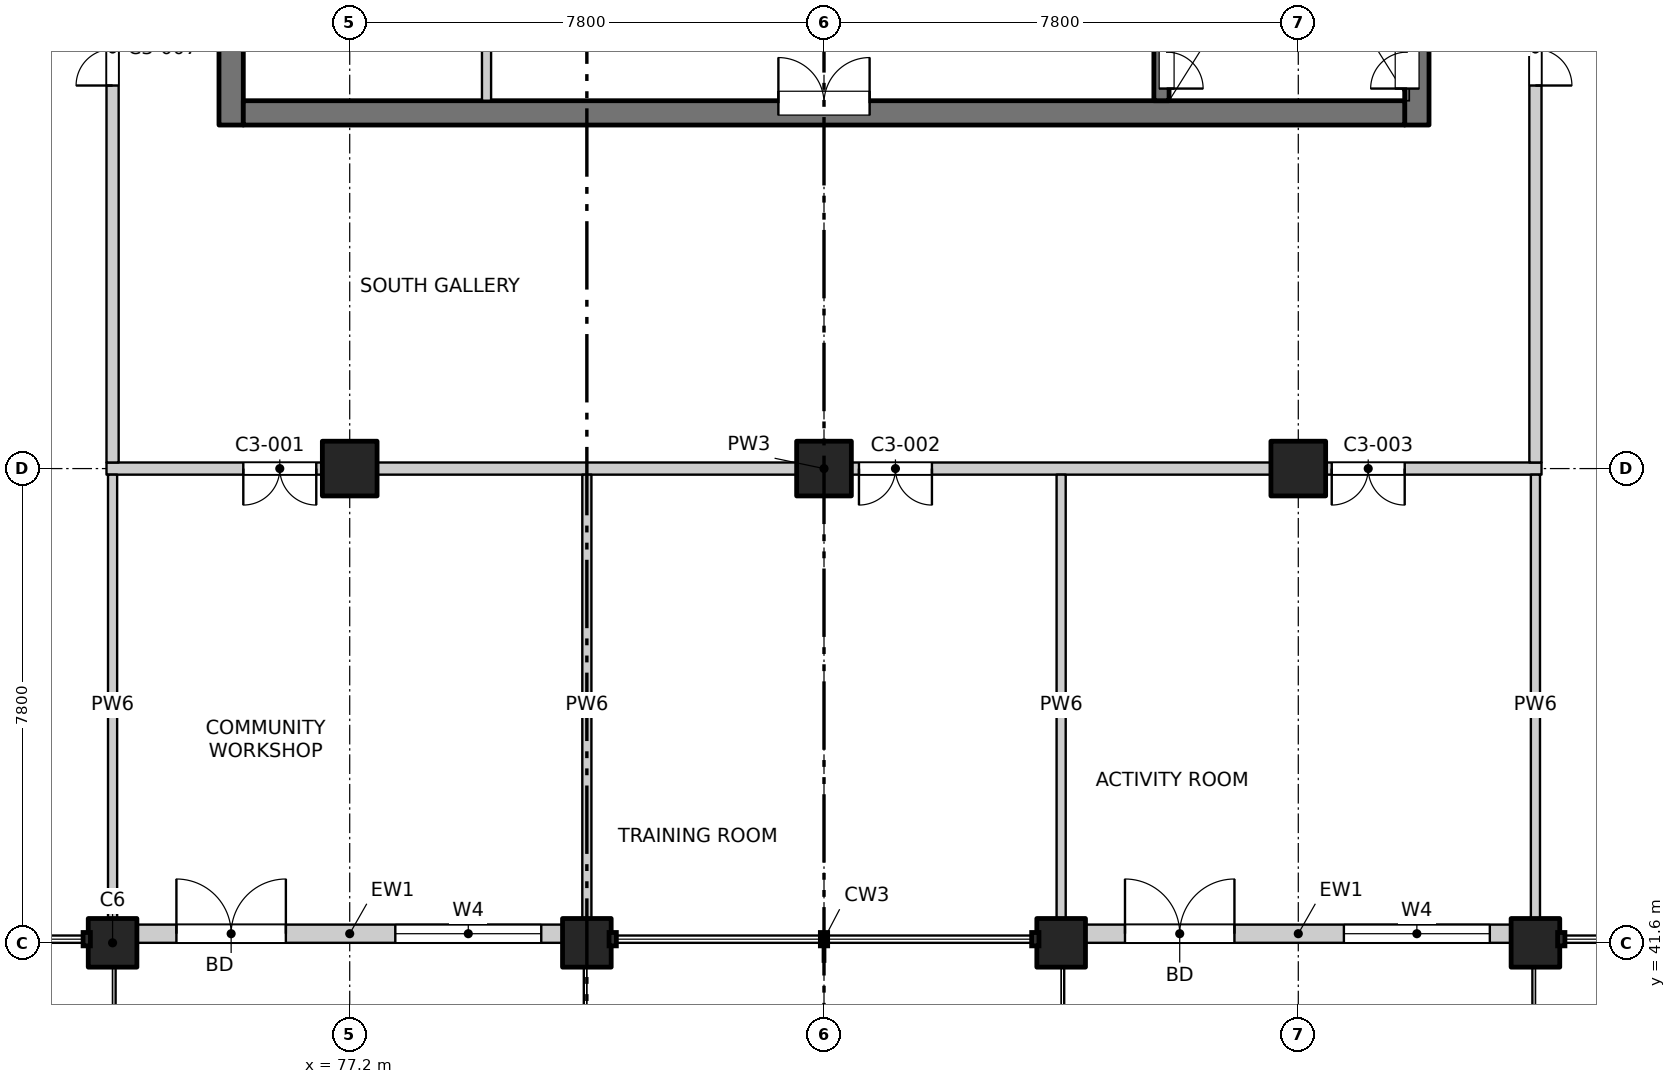
"""IFC4 building model, lengths in metres.
Left out: names, types, materials, properties, quantities, classifications, styles, units other than length and angle.
Written with IfcOpenShell. Run it as: python <this file> out.ifc"""

import sys

from ifc_helpers import new_model, si_unit, direction, frame, frame_2d, origin, origin_2d, place, context, subcontext, project, spatial, rectangle, extrude, element, fill, save


model = new_model("IFC4")
c1 = context("Model", 3, precision=1e-05, world=origin(), true_north=direction((0.0, 1.0)))
c2 = subcontext(c1, "Body", "Model", "MODEL_VIEW")
j1 = project(units=[si_unit("LENGTHUNIT", "METRE"), si_unit("PLANEANGLEUNIT", "RADIAN")], contexts=[c1])
p1 = place(None, origin())
s1 = spatial("IfcSite", under=j1, at=p1, CompositionType="ELEMENT")
p2 = place(p1, origin())
s2 = spatial("IfcBuilding", under=s1, at=p2, CompositionType="ELEMENT")
p3 = place(p2, frame((0.0, 0.0, 200.7)))
s3 = spatial("IfcBuildingStorey", under=s2, at=p3, CompositionType="ELEMENT", Elevation=200.7)
for number, where, z_axis, x_axis in (
    (1, (73.3, 41.6, -0.25), (0.0, 0.0, 1.0), (1.0, 0.0, 0.0)),
    (2, (81.1, 41.6, -0.25), (0.0, 0.0, 1.0), (1.0, 0.0, 0.0)),
    (3, (88.9, 41.6, -0.25), (0.0, 0.0, 1.0), (1.0, 0.0, 0.0)),
    (4, (96.7, 41.6, -0.25), (0.0, 0.0, 1.0), (1.0, 0.0, 0.0)),
):
    element("IfcColumn", number, at=place(p3, frame(where, z_axis=z_axis, x_axis=x_axis)), inside=s3, PredefinedType="COLUMN", context=c2, shape_type="SweptSolid", body=[
        extrude(rectangle(XDim=0.8, YDim=0.8, at=origin_2d()), origin(), (0.0, 0.0, 1.0), 3.4),
    ])
for number, where, z_axis, x_axis in (
    (5, (77.2, 49.4, -0.25), (0.0, 0.0, 1.0), (1.0, 0.0, 0.0)),
    (6, (85.0, 49.4, -0.25), (0.0, 0.0, 1.0), (1.0, 0.0, 0.0)),
    (7, (92.8, 49.4, -0.25), (0.0, 0.0, 1.0), (1.0, 0.0, 0.0)),
):
    element("IfcColumn", number, at=place(p3, frame(where, z_axis=z_axis, x_axis=x_axis)), inside=s3, PredefinedType="COLUMN", context=c2, shape_type="SweptSolid", body=[
        extrude(rectangle(XDim=0.9, YDim=0.9, at=origin_2d()), origin(), (0.0, 0.0, 1.0), 3.4),
    ])
p4 = place(p3, frame((75.25, 55.05, -0.25), z_axis=(0.0, 0.0, 1.0), x_axis=(0.0, 1.0, 0.0)))
e8 = element("IfcWall", 8, at=p4, inside=s3, PredefinedType="SOLIDWALL", context=c2, shape_type="SweptSolid", body=[
    extrude(rectangle(XDim=22.25, YDim=0.4, at=frame_2d((11.125, 0.0))), origin(), (0.0, 0.0, 1.0), 3.4),
])
p5 = place(p4, frame((7.4, 0.0, 0.25)))
e9 = element("IfcOpeningElement", 9, at=p5, cuts=e8, PredefinedType="OPENING", context=c2, shape_type="SweptSolid", body=[
    extrude(rectangle(XDim=0.9, YDim=2.1, at=frame_2d((0.45, 1.05))), frame((0.0, 0.21, 0.0), z_axis=(0.0, -1.0, 0.0), x_axis=(1.0, 0.0, 0.0)), (0.0, 0.0, 1.0), 0.42),
])
p6 = place(p4, frame((10.7, 0.0, 0.25)))
e10 = element("IfcOpeningElement", 10, at=p6, cuts=e8, PredefinedType="OPENING", context=c2, shape_type="SweptSolid", body=[
    extrude(rectangle(XDim=0.9, YDim=2.1, at=frame_2d((0.45, 1.05))), frame((0.0, 0.21, 0.0), z_axis=(0.0, -1.0, 0.0), x_axis=(1.0, 0.0, 0.0)), (0.0, 0.0, 1.0), 0.42),
])
p7 = place(p4, frame((13.7, 0.0, 0.25)))
e11 = element("IfcOpeningElement", 11, at=p7, cuts=e8, PredefinedType="OPENING", context=c2, shape_type="SweptSolid", body=[
    extrude(rectangle(XDim=0.9, YDim=2.1, at=frame_2d((0.45, 1.05))), frame((0.0, 0.21, 0.0), z_axis=(0.0, -1.0, 0.0), x_axis=(1.0, 0.0, 0.0)), (0.0, 0.0, 1.0), 0.42),
])
p8 = place(p4, frame((16.7, 0.0, 0.25)))
e12 = element("IfcOpeningElement", 12, at=p8, cuts=e8, PredefinedType="OPENING", context=c2, shape_type="SweptSolid", body=[
    extrude(rectangle(XDim=0.9, YDim=2.1, at=frame_2d((0.45, 1.05))), frame((0.0, 0.21, 0.0), z_axis=(0.0, -1.0, 0.0), x_axis=(1.0, 0.0, 0.0)), (0.0, 0.0, 1.0), 0.42),
])
p9 = place(p4, frame((20.0, 0.0, 0.25)))
e13 = element("IfcOpeningElement", 13, at=p9, cuts=e8, PredefinedType="OPENING", context=c2, shape_type="SweptSolid", body=[
    extrude(rectangle(XDim=0.9, YDim=2.1, at=frame_2d((0.45, 1.05))), frame((0.0, 0.21, 0.0), z_axis=(0.0, -1.0, 0.0), x_axis=(1.0, 0.0, 0.0)), (0.0, 0.0, 1.0), 0.42),
])
p10 = place(p3, frame((94.75, 55.05, -0.25), z_axis=(0.0, 0.0, 1.0), x_axis=(0.0, 1.0, 0.0)))
e14 = element("IfcWall", 14, at=p10, inside=s3, PredefinedType="SOLIDWALL", context=c2, shape_type="SweptSolid", body=[
    extrude(rectangle(XDim=6.9, YDim=0.4, at=frame_2d((3.45, 0.0))), origin(), (0.0, 0.0, 1.0), 3.4),
])
p11 = place(p10, frame((0.6, 0.0, 0.25)))
e15 = element("IfcOpeningElement", 15, at=p11, cuts=e14, PredefinedType="OPENING", context=c2, shape_type="SweptSolid", body=[
    extrude(rectangle(XDim=1.2, YDim=2.1, at=frame_2d((0.6, 1.05))), frame((0.0, 0.21, 0.0), z_axis=(0.0, -1.0, 0.0), x_axis=(1.0, 0.0, 0.0)), (0.0, 0.0, 1.0), 0.42),
])
p12 = place(p3, frame((75.45, 55.25, -0.25), z_axis=(0.0, 0.0, 1.0), x_axis=(1.0, 0.0, 0.0)))
e16 = element("IfcWall", 16, at=p12, inside=s3, PredefinedType="SOLIDWALL", context=c2, shape_type="SweptSolid", body=[
    extrude(rectangle(XDim=19.1, YDim=0.4, at=frame_2d((9.55, 0.0))), origin(), (0.0, 0.0, 1.0), 3.4),
])
p13 = place(p12, frame((8.8, 0.0, 0.25)))
e17 = element("IfcOpeningElement", 17, at=p13, cuts=e16, PredefinedType="OPENING", context=c2, shape_type="SweptSolid", body=[
    extrude(rectangle(XDim=1.5, YDim=2.1, at=frame_2d((0.75, 1.05))), frame((0.0, 0.21, 0.0), z_axis=(0.0, -1.0, 0.0), x_axis=(1.0, 0.0, 0.0)), (0.0, 0.0, 1.0), 0.42),
])
p14 = place(p3, frame((90.55, 55.45, -0.25), z_axis=(0.0, 0.0, 1.0), x_axis=(0.0, 1.0, 0.0)))
e18 = element("IfcWall", 18, at=p14, inside=s3, PredefinedType="SOLIDWALL", context=c2, shape_type="SweptSolid", body=[
    extrude(rectangle(XDim=6.5, YDim=0.25, at=frame_2d((3.25, 0.0))), origin(), (0.0, 0.0, 1.0), 3.4),
])
p15 = place(p14, frame((0.2, 0.0, 0.25)))
e19 = element("IfcOpeningElement", 19, at=p15, cuts=e18, PredefinedType="OPENING", context=c2, shape_type="SweptSolid", body=[
    extrude(rectangle(XDim=1.2, YDim=2.1, at=frame_2d((0.6, 1.05))), frame((0.0, 0.135, 0.0), z_axis=(0.0, -1.0, 0.0), x_axis=(1.0, 0.0, 0.0)), (0.0, 0.0, 1.0), 0.27),
])
p16 = place(p3, frame((73.7, 41.75, 0.0), z_axis=(0.0, 0.0, 1.0), x_axis=(1.0, 0.0, 0.0)))
e20 = element("IfcWall", 20, at=p16, inside=s3, PredefinedType="SOLIDWALL", context=c2, shape_type="SweptSolid", body=[
    extrude(rectangle(XDim=7.0, YDim=0.3, at=frame_2d((3.5, 0.0))), origin(), (0.0, 0.0, 1.0), 2.7),
])
p17 = place(p16, frame((0.65, 0.0, 0.0)))
e21 = element("IfcOpeningElement", 21, at=p17, cuts=e20, PredefinedType="OPENING", context=c2, shape_type="SweptSolid", body=[
    extrude(rectangle(XDim=1.8, YDim=2.4, at=frame_2d((0.9, 1.2))), frame((0.0, 0.16, 0.0), z_axis=(0.0, -1.0, 0.0), x_axis=(1.0, 0.0, 0.0)), (0.0, 0.0, 1.0), 0.32),
])
p18 = place(p16, frame((4.25, 0.0, 0.6)))
e22 = element("IfcOpeningElement", 22, at=p18, cuts=e20, PredefinedType="OPENING", context=c2, shape_type="SweptSolid", body=[
    extrude(rectangle(XDim=2.4, YDim=2.1, at=frame_2d((1.2, 1.05))), frame((0.0, 0.16, 0.0), z_axis=(0.0, -1.0, 0.0), x_axis=(1.0, 0.0, 0.0)), (0.0, 0.0, 1.0), 0.32),
])
p19 = place(p3, frame((89.3, 41.75, 0.0), z_axis=(0.0, 0.0, 1.0), x_axis=(1.0, 0.0, 0.0)))
e23 = element("IfcWall", 23, at=p19, inside=s3, PredefinedType="SOLIDWALL", context=c2, shape_type="SweptSolid", body=[
    extrude(rectangle(XDim=7.0, YDim=0.3, at=frame_2d((3.5, 0.0))), origin(), (0.0, 0.0, 1.0), 2.7),
])
p20 = place(p19, frame((0.65, 0.0, 0.0)))
e24 = element("IfcOpeningElement", 24, at=p20, cuts=e23, PredefinedType="OPENING", context=c2, shape_type="SweptSolid", body=[
    extrude(rectangle(XDim=1.8, YDim=2.4, at=frame_2d((0.9, 1.2))), frame((0.0, 0.16, 0.0), z_axis=(0.0, -1.0, 0.0), x_axis=(1.0, 0.0, 0.0)), (0.0, 0.0, 1.0), 0.32),
])
p21 = place(p19, frame((4.25, 0.0, 0.6)))
e25 = element("IfcOpeningElement", 25, at=p21, cuts=e23, PredefinedType="OPENING", context=c2, shape_type="SweptSolid", body=[
    extrude(rectangle(XDim=2.4, YDim=2.1, at=frame_2d((1.2, 1.05))), frame((0.0, 0.16, 0.0), z_axis=(0.0, -1.0, 0.0), x_axis=(1.0, 0.0, 0.0)), (0.0, 0.0, 1.0), 0.32),
])
p22 = place(p3, frame((73.2, 49.4, 0.0), z_axis=(0.0, 0.0, 1.0), x_axis=(1.0, 0.0, 0.0)))
e26 = element("IfcWall", 26, at=p22, inside=s3, PredefinedType="PARTITIONING", context=c2, shape_type="SweptSolid", body=[
    extrude(rectangle(XDim=23.6, YDim=0.2, at=frame_2d((11.8, 0.0))), origin(), (0.0, 0.0, 1.0), 3.15),
])
p23 = place(p22, frame((2.25, 0.0, 0.0)))
e27 = element("IfcOpeningElement", 27, at=p23, cuts=e26, PredefinedType="OPENING", context=c2, shape_type="SweptSolid", body=[
    extrude(rectangle(XDim=1.2, YDim=2.1, at=frame_2d((0.6, 1.05))), frame((0.0, 0.11, 0.0), z_axis=(0.0, -1.0, 0.0), x_axis=(1.0, 0.0, 0.0)), (0.0, 0.0, 1.0), 0.22),
])
p24 = place(p22, frame((12.375, 0.0, 0.0)))
e28 = element("IfcOpeningElement", 28, at=p24, cuts=e26, PredefinedType="OPENING", context=c2, shape_type="SweptSolid", body=[
    extrude(rectangle(XDim=1.2, YDim=2.1, at=frame_2d((0.6, 1.05))), frame((0.0, 0.11, 0.0), z_axis=(0.0, -1.0, 0.0), x_axis=(1.0, 0.0, 0.0)), (0.0, 0.0, 1.0), 0.22),
])
p25 = place(p22, frame((20.15, 0.0, 0.0)))
e29 = element("IfcOpeningElement", 29, at=p25, cuts=e26, PredefinedType="OPENING", context=c2, shape_type="SweptSolid", body=[
    extrude(rectangle(XDim=1.2, YDim=2.1, at=frame_2d((0.6, 1.05))), frame((0.0, 0.11, 0.0), z_axis=(0.0, -1.0, 0.0), x_axis=(1.0, 0.0, 0.0)), (0.0, 0.0, 1.0), 0.22),
])
p26 = place(p3, frame((73.3, 41.735, 0.0), z_axis=(0.0, 0.0, 1.0), x_axis=(0.0, 1.0, 0.0)))
e30 = element("IfcWall", 30, at=p26, inside=s3, PredefinedType="PARTITIONING", context=c2, shape_type="SweptSolid", body=[
    extrude(rectangle(XDim=7.565, YDim=0.15, at=frame_2d((3.782, 0.0))), origin(), (0.0, 0.0, 1.0), 3.15),
])
p27 = place(p3, frame((73.3, 49.5, 0.0), z_axis=(0.0, 0.0, 1.0), x_axis=(0.0, 1.0, 0.0)))
e31 = element("IfcWall", 31, at=p27, inside=s3, PredefinedType="PARTITIONING", context=c2, shape_type="SweptSolid", body=[
    extrude(rectangle(XDim=34.9, YDim=0.2, at=frame_2d((17.45, 0.0))), origin(), (0.0, 0.0, 1.0), 3.15),
])
p28 = place(p27, frame((6.2, 0.0, 0.0)))
e32 = element("IfcOpeningElement", 32, at=p28, cuts=e31, PredefinedType="OPENING", context=c2, shape_type="SweptSolid", body=[
    extrude(rectangle(XDim=1.2, YDim=2.1, at=frame_2d((0.6, 1.05))), frame((0.0, 0.11, 0.0), z_axis=(0.0, -1.0, 0.0), x_axis=(1.0, 0.0, 0.0)), (0.0, 0.0, 1.0), 0.22),
])
p29 = place(p27, frame((12.95, 0.0, 0.0)))
e33 = element("IfcOpeningElement", 33, at=p29, cuts=e31, PredefinedType="OPENING", context=c2, shape_type="SweptSolid", body=[
    extrude(rectangle(XDim=1.2, YDim=2.1, at=frame_2d((0.6, 1.05))), frame((0.0, 0.11, 0.0), z_axis=(0.0, -1.0, 0.0), x_axis=(1.0, 0.0, 0.0)), (0.0, 0.0, 1.0), 0.22),
])
p30 = place(p27, frame((16.85, 0.0, 0.0)))
e34 = element("IfcOpeningElement", 34, at=p30, cuts=e31, PredefinedType="OPENING", context=c2, shape_type="SweptSolid", body=[
    extrude(rectangle(XDim=1.2, YDim=2.1, at=frame_2d((0.6, 1.05))), frame((0.0, 0.11, 0.0), z_axis=(0.0, -1.0, 0.0), x_axis=(1.0, 0.0, 0.0)), (0.0, 0.0, 1.0), 0.22),
])
p31 = place(p27, frame((28.55, 0.0, 0.0)))
e35 = element("IfcOpeningElement", 35, at=p31, cuts=e31, PredefinedType="OPENING", context=c2, shape_type="SweptSolid", body=[
    extrude(rectangle(XDim=1.2, YDim=2.1, at=frame_2d((0.6, 1.05))), frame((0.0, 0.11, 0.0), z_axis=(0.0, -1.0, 0.0), x_axis=(1.0, 0.0, 0.0)), (0.0, 0.0, 1.0), 0.22),
])
p32 = place(p3, frame((79.45, 55.45, 0.0), z_axis=(0.0, 0.0, 1.0), x_axis=(0.0, 1.0, 0.0)))
e36 = element("IfcWall", 36, at=p32, inside=s3, PredefinedType="PARTITIONING", context=c2, shape_type="SweptSolid", body=[
    extrude(rectangle(XDim=5.45, YDim=0.15, at=frame_2d((2.725, 0.0))), origin(), (0.0, 0.0, 1.0), 3.15),
])
p33 = place(p32, frame((2.25, 0.0, 0.0)))
e37 = element("IfcOpeningElement", 37, at=p33, cuts=e36, PredefinedType="OPENING", context=c2, shape_type="SweptSolid", body=[
    extrude(rectangle(XDim=0.9, YDim=2.1, at=frame_2d((0.45, 1.05))), frame((0.0, 0.085, 0.0), z_axis=(0.0, -1.0, 0.0), x_axis=(1.0, 0.0, 0.0)), (0.0, 0.0, 1.0), 0.17),
])
for number, where, z_axis, x_axis in (
    (38, (81.1, 41.735, 0.0), (0.0, 0.0, 1.0), (0.0, 1.0, 0.0)),
    (39, (88.9, 41.735, 0.0), (0.0, 0.0, 1.0), (0.0, 1.0, 0.0)),
):
    element("IfcWall", number, at=place(p3, frame(where, z_axis=z_axis, x_axis=x_axis)), inside=s3, PredefinedType="PARTITIONING", context=c2, shape_type="SweptSolid", body=[
        extrude(rectangle(XDim=7.565, YDim=0.15, at=frame_2d((3.782, 0.0))), origin(), (0.0, 0.0, 1.0), 2.55),
    ])
p34 = place(p3, frame((96.7, 41.735, 0.0), z_axis=(0.0, 0.0, 1.0), x_axis=(0.0, 1.0, 0.0)))
e40 = element("IfcWall", 40, at=p34, inside=s3, PredefinedType="PARTITIONING", context=c2, shape_type="SweptSolid", body=[
    extrude(rectangle(XDim=7.565, YDim=0.15, at=frame_2d((3.782, 0.0))), origin(), (0.0, 0.0, 1.0), 3.15),
])
p35 = place(p3, frame((96.7, 49.5, 0.0), z_axis=(0.0, 0.0, 1.0), x_axis=(0.0, 1.0, 0.0)))
e41 = element("IfcWall", 41, at=p35, inside=s3, PredefinedType="PARTITIONING", context=c2, shape_type="SweptSolid", body=[
    extrude(rectangle(XDim=34.9, YDim=0.2, at=frame_2d((17.45, 0.0))), origin(), (0.0, 0.0, 1.0), 3.15),
])
p36 = place(p35, frame((6.2, 0.0, 0.0)))
e42 = element("IfcOpeningElement", 42, at=p36, cuts=e41, PredefinedType="OPENING", context=c2, shape_type="SweptSolid", body=[
    extrude(rectangle(XDim=1.2, YDim=2.1, at=frame_2d((0.6, 1.05))), frame((0.0, 0.11, 0.0), z_axis=(0.0, -1.0, 0.0), x_axis=(1.0, 0.0, 0.0)), (0.0, 0.0, 1.0), 0.22),
])
p37 = place(p35, frame((12.95, 0.0, 0.0)))
e43 = element("IfcOpeningElement", 43, at=p37, cuts=e41, PredefinedType="OPENING", context=c2, shape_type="SweptSolid", body=[
    extrude(rectangle(XDim=1.2, YDim=2.1, at=frame_2d((0.6, 1.05))), frame((0.0, 0.11, 0.0), z_axis=(0.0, -1.0, 0.0), x_axis=(1.0, 0.0, 0.0)), (0.0, 0.0, 1.0), 0.22),
])
p38 = place(p35, frame((18.7, 0.0, 0.0)))
e44 = element("IfcOpeningElement", 44, at=p38, cuts=e41, PredefinedType="OPENING", context=c2, shape_type="SweptSolid", body=[
    extrude(rectangle(XDim=1.2, YDim=2.1, at=frame_2d((0.6, 1.05))), frame((0.0, 0.11, 0.0), z_axis=(0.0, -1.0, 0.0), x_axis=(1.0, 0.0, 0.0)), (0.0, 0.0, 1.0), 0.22),
])
p39 = place(p35, frame((24.65, 0.0, 0.0)))
e45 = element("IfcOpeningElement", 45, at=p39, cuts=e41, PredefinedType="OPENING", context=c2, shape_type="SweptSolid", body=[
    extrude(rectangle(XDim=1.2, YDim=2.1, at=frame_2d((0.6, 1.05))), frame((0.0, 0.11, 0.0), z_axis=(0.0, -1.0, 0.0), x_axis=(1.0, 0.0, 0.0)), (0.0, 0.0, 1.0), 0.22),
])
p40 = place(p35, frame((32.45, 0.0, 0.0)))
e46 = element("IfcOpeningElement", 46, at=p40, cuts=e41, PredefinedType="OPENING", context=c2, shape_type="SweptSolid", body=[
    extrude(rectangle(XDim=1.2, YDim=2.1, at=frame_2d((0.6, 1.05))), frame((0.0, 0.11, 0.0), z_axis=(0.0, -1.0, 0.0), x_axis=(1.0, 0.0, 0.0)), (0.0, 0.0, 1.0), 0.22),
])
p41 = place(p17, origin())
e47 = element("IfcDoor", 47, at=p41, inside=s3, OperationType="DOUBLE_DOOR_SINGLE_SWING", PredefinedType="DOOR", context=c2, shape_type="SweptSolid", body=[
    extrude(rectangle(XDim=1.8, YDim=2.4, at=frame_2d((0.9, 1.2))), frame((0.0, 0.025, 0.0), z_axis=(0.0, -1.0, 0.0), x_axis=(1.0, 0.0, 0.0)), (0.0, 0.0, 1.0), 0.05),
])
fill(e21, e47)
p42 = place(p18, origin())
e48 = element("IfcWindow", 48, at=p42, inside=s3, PartitioningType="SINGLE_PANEL", PredefinedType="WINDOW", context=c2, shape_type="SweptSolid", body=[
    extrude(rectangle(XDim=2.4, YDim=2.1, at=frame_2d((1.2, 1.05))), frame((0.0, 0.03, 0.0), z_axis=(0.0, -1.0, 0.0), x_axis=(1.0, 0.0, 0.0)), (0.0, 0.0, 1.0), 0.06),
])
fill(e22, e48)
p43 = place(p20, origin())
e49 = element("IfcDoor", 49, at=p43, inside=s3, OperationType="DOUBLE_DOOR_SINGLE_SWING", PredefinedType="DOOR", context=c2, shape_type="SweptSolid", body=[
    extrude(rectangle(XDim=1.8, YDim=2.4, at=frame_2d((0.9, 1.2))), frame((0.0, 0.025, 0.0), z_axis=(0.0, -1.0, 0.0), x_axis=(1.0, 0.0, 0.0)), (0.0, 0.0, 1.0), 0.05),
])
fill(e24, e49)
p44 = place(p21, origin())
e50 = element("IfcWindow", 50, at=p44, inside=s3, PartitioningType="SINGLE_PANEL", PredefinedType="WINDOW", context=c2, shape_type="SweptSolid", body=[
    extrude(rectangle(XDim=2.4, YDim=2.1, at=frame_2d((1.2, 1.05))), frame((0.0, 0.03, 0.0), z_axis=(0.0, -1.0, 0.0), x_axis=(1.0, 0.0, 0.0)), (0.0, 0.0, 1.0), 0.06),
])
fill(e25, e50)
p45 = place(p23, origin())
e51 = element("IfcDoor", 51, at=p45, inside=s3, OperationType="DOUBLE_DOOR_SINGLE_SWING", PredefinedType="DOOR", context=c2, shape_type="SweptSolid", body=[
    extrude(rectangle(XDim=1.2, YDim=2.1, at=frame_2d((0.6, 1.05))), frame((0.0, 0.025, 0.0), z_axis=(0.0, -1.0, 0.0), x_axis=(1.0, 0.0, 0.0)), (0.0, 0.0, 1.0), 0.05),
])
fill(e27, e51)
p46 = place(p24, origin())
e52 = element("IfcDoor", 52, at=p46, inside=s3, OperationType="DOUBLE_DOOR_SINGLE_SWING", PredefinedType="DOOR", context=c2, shape_type="SweptSolid", body=[
    extrude(rectangle(XDim=1.2, YDim=2.1, at=frame_2d((0.6, 1.05))), frame((0.0, 0.025, 0.0), z_axis=(0.0, -1.0, 0.0), x_axis=(1.0, 0.0, 0.0)), (0.0, 0.0, 1.0), 0.05),
])
fill(e28, e52)
p47 = place(p25, origin())
e53 = element("IfcDoor", 53, at=p47, inside=s3, OperationType="DOUBLE_DOOR_SINGLE_SWING", PredefinedType="DOOR", context=c2, shape_type="SweptSolid", body=[
    extrude(rectangle(XDim=1.2, YDim=2.1, at=frame_2d((0.6, 1.05))), frame((0.0, 0.025, 0.0), z_axis=(0.0, -1.0, 0.0), x_axis=(1.0, 0.0, 0.0)), (0.0, 0.0, 1.0), 0.05),
])
fill(e29, e53)
p48 = place(p13, origin())
e54 = element("IfcDoor", 54, at=p48, inside=s3, OperationType="DOUBLE_DOOR_SINGLE_SWING", PredefinedType="DOOR", context=c2, shape_type="SweptSolid", body=[
    extrude(rectangle(XDim=1.5, YDim=2.1, at=frame_2d((0.75, 1.05))), frame((0.0, 0.185, 0.0), z_axis=(0.0, -1.0, 0.0), x_axis=(1.0, 0.0, 0.0)), (0.0, 0.0, 1.0), 0.05),
])
fill(e17, e54)
p49 = place(p15, origin())
e55 = element("IfcDoor", 55, at=p49, inside=s3, OperationType="DOUBLE_DOOR_SINGLE_SWING", PredefinedType="DOOR", context=c2, shape_type="SweptSolid", body=[
    extrude(rectangle(XDim=1.2, YDim=2.1, at=frame_2d((0.6, 1.05))), frame((0.0, -0.06, 0.0), z_axis=(0.0, -1.0, 0.0), x_axis=(1.0, 0.0, 0.0)), (0.0, 0.0, 1.0), 0.05),
])
fill(e19, e55)
p50 = place(p11, origin())
e56 = element("IfcDoor", 56, at=p50, inside=s3, OperationType="DOUBLE_DOOR_SINGLE_SWING", PredefinedType="DOOR", context=c2, shape_type="SweptSolid", body=[
    extrude(rectangle(XDim=1.2, YDim=2.1, at=frame_2d((0.6, 1.05))), frame((0.0, 0.185, 0.0), z_axis=(0.0, -1.0, 0.0), x_axis=(1.0, 0.0, 0.0)), (0.0, 0.0, 1.0), 0.05),
])
fill(e15, e56)
p51 = place(p28, origin())
e57 = element("IfcDoor", 57, at=p51, inside=s3, OperationType="DOUBLE_DOOR_SINGLE_SWING", PredefinedType="DOOR", context=c2, shape_type="SweptSolid", body=[
    extrude(rectangle(XDim=1.2, YDim=2.1, at=frame_2d((0.6, 1.05))), frame((0.0, 0.025, 0.0), z_axis=(0.0, -1.0, 0.0), x_axis=(1.0, 0.0, 0.0)), (0.0, 0.0, 1.0), 0.05),
])
fill(e32, e57)
p52 = place(p36, origin())
e58 = element("IfcDoor", 58, at=p52, inside=s3, OperationType="DOUBLE_DOOR_SINGLE_SWING", PredefinedType="DOOR", context=c2, shape_type="SweptSolid", body=[
    extrude(rectangle(XDim=1.2, YDim=2.1, at=frame_2d((0.6, 1.05))), frame((0.0, 0.025, 0.0), z_axis=(0.0, -1.0, 0.0), x_axis=(1.0, 0.0, 0.0)), (0.0, 0.0, 1.0), 0.05),
])
fill(e42, e58)
save(model, sys.argv[1])
